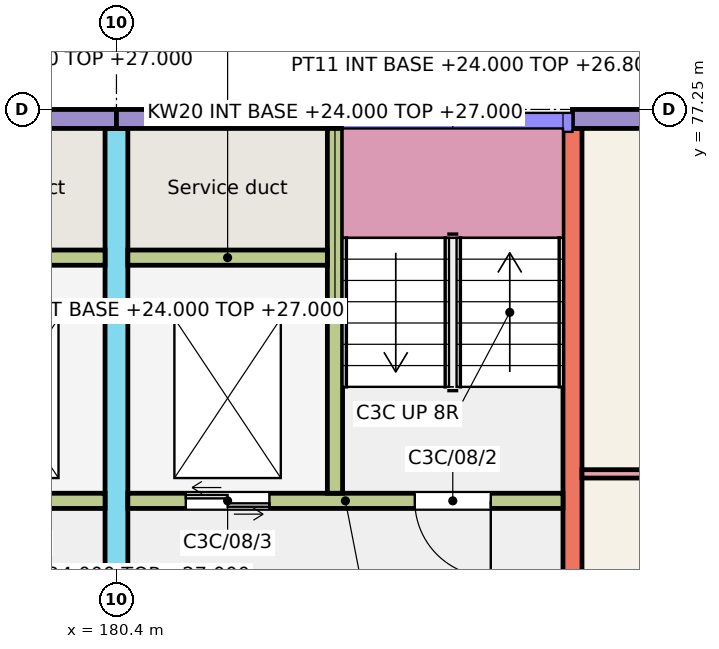
"""IFC4 building model, lengths in metres.
Left out: names, types, materials, properties, quantities, classifications, styles, units other than length and angle.
Written with IfcOpenShell. Run it as: python <this file> out.ifc"""

import sys

from ifc_helpers import new_model, si_unit, direction, frame, frame_2d, origin, place, context, subcontext, project, spatial, rectangle, extrude, element, fill, save


model = new_model("IFC4")
c1 = context("Model", 3, precision=1e-05, world=origin(), true_north=direction((0.0, 1.0)))
c2 = subcontext(c1, "Body", "Model", "MODEL_VIEW")
j1 = project(units=[si_unit("LENGTHUNIT", "METRE"), si_unit("PLANEANGLEUNIT", "RADIAN")], contexts=[c1])
p1 = place(None, origin())
s1 = spatial("IfcSite", under=j1, at=p1, CompositionType="ELEMENT")
p2 = place(p1, origin())
s2 = spatial("IfcBuilding", under=s1, at=p2, CompositionType="ELEMENT")
p3 = place(p2, frame((0.0, 0.0, 24.0)))
s3 = spatial("IfcBuildingStorey", under=s2, at=p3, CompositionType="ELEMENT", Elevation=24.0)
p4 = place(p3, frame((180.4, 66.0, 0.0), z_axis=(0.0, 0.0, 1.0), x_axis=(0.0, 1.0, 0.0)))
e1 = element("IfcWall", 1, at=p4, inside=s3, PredefinedType="SHEAR", context=c2, shape_type="SweptSolid", body=[
    extrude(rectangle(XDim=11.0, YDim=0.3, at=frame_2d((5.5, 0.0))), origin(), (0.0, 0.0, 1.0), 3.0),
])
p5 = place(p4, frame((0.3, 0.0, 0.0)))
e2 = element("IfcOpeningElement", 2, at=p5, cuts=e1, PredefinedType="OPENING", context=c2, shape_type="SweptSolid", body=[
    extrude(rectangle(XDim=1.2, YDim=2.1, at=frame_2d((0.6, 1.05))), frame((0.0, 0.16, 0.0), z_axis=(0.0, -1.0, 0.0), x_axis=(1.0, 0.0, 0.0)), (0.0, 0.0, 1.0), 0.32),
])
p6 = place(p3, frame((186.4, 68.0, 0.0), z_axis=(0.0, 0.0, 1.0), x_axis=(0.0, 1.0, 0.0)))
e3 = element("IfcWall", 3, at=p6, inside=s3, PredefinedType="SHEAR", context=c2, shape_type="SweptSolid", body=[
    extrude(rectangle(XDim=9.0, YDim=0.25, at=frame_2d((4.5, 0.0))), origin(), (0.0, 0.0, 1.0), 3.0),
])
p7 = place(p3, frame((177.425, 77.125, 0.0), z_axis=(0.0, 0.0, 1.0), x_axis=(1.0, 0.0, 0.0)))
e4 = element("IfcWall", 4, at=p7, inside=s3, PredefinedType="SOLIDWALL", context=c2, shape_type="SweptSolid", body=[
    extrude(rectangle(XDim=2.975, YDim=0.25, at=frame_2d((1.487, 0.0))), origin(), (0.0, 0.0, 1.0), 3.0),
])
p8 = place(p3, frame((174.525, 72.1, 0.0), z_axis=(0.0, 0.0, 1.0), x_axis=(1.0, 0.0, 0.0)))
e5 = element("IfcWall", 5, at=p8, inside=s3, PredefinedType="SHEAR", context=c2, shape_type="SweptSolid", body=[
    extrude(rectangle(XDim=5.725, YDim=0.2, at=frame_2d((2.863, 0.0))), origin(), (0.0, 0.0, 1.0), 3.0),
])
p9 = place(p8, frame((0.95, 0.0, 0.0)))
e6 = element("IfcOpeningElement", 6, at=p9, cuts=e5, PredefinedType="OPENING", context=c2, shape_type="SweptSolid", body=[
    extrude(rectangle(XDim=1.0, YDim=2.1, at=frame_2d((0.5, 1.05))), frame((0.0, 0.11, 0.0), z_axis=(0.0, -1.0, 0.0), x_axis=(1.0, 0.0, 0.0)), (0.0, 0.0, 1.0), 0.22),
])
p10 = place(p8, frame((3.863, 0.0, 0.0)))
e7 = element("IfcOpeningElement", 7, at=p10, cuts=e5, PredefinedType="OPENING", context=c2, shape_type="SweptSolid", body=[
    extrude(rectangle(XDim=1.1, YDim=2.1, at=frame_2d((0.55, 1.05))), frame((0.0, 0.11, 0.0), z_axis=(0.0, -1.0, 0.0), x_axis=(1.0, 0.0, 0.0)), (0.0, 0.0, 1.0), 0.22),
])
p11 = place(p3, frame((177.625, 75.3, 0.0), z_axis=(0.0, 0.0, 1.0), x_axis=(1.0, 0.0, 0.0)))
e8 = element("IfcWall", 8, at=p11, inside=s3, PredefinedType="SHEAR", context=c2, shape_type="SweptSolid", body=[
    extrude(rectangle(XDim=2.625, YDim=0.2, at=frame_2d((1.312, 0.0))), origin(), (0.0, 0.0, 1.0), 3.0),
])
p12 = place(p3, frame((180.4, 77.125, 0.0), z_axis=(0.0, 0.0, 1.0), x_axis=(1.0, 0.0, 0.0)))
e9 = element("IfcWall", 9, at=p12, inside=s3, PredefinedType="SOLIDWALL", context=c2, shape_type="SweptSolid", body=[
    extrude(rectangle(XDim=2.975, YDim=0.25, at=frame_2d((1.488, 0.0))), origin(), (0.0, 0.0, 1.0), 3.0),
])
p13 = place(p3, frame((180.55, 72.1, 0.0), z_axis=(0.0, 0.0, 1.0), x_axis=(1.0, 0.0, 0.0)))
e10 = element("IfcWall", 10, at=p13, inside=s3, PredefinedType="SHEAR", context=c2, shape_type="SweptSolid", body=[
    extrude(rectangle(XDim=5.725, YDim=0.2, at=frame_2d((2.862, 0.0))), origin(), (0.0, 0.0, 1.0), 3.0),
])
p14 = place(p13, frame((3.775, 0.0, 0.0)))
e11 = element("IfcOpeningElement", 11, at=p14, cuts=e10, PredefinedType="OPENING", context=c2, shape_type="SweptSolid", body=[
    extrude(rectangle(XDim=1.0, YDim=2.1, at=frame_2d((0.5, 1.05))), frame((0.0, 0.11, 0.0), z_axis=(0.0, -1.0, 0.0), x_axis=(1.0, 0.0, 0.0)), (0.0, 0.0, 1.0), 0.22),
])
p15 = place(p13, frame((0.762, 0.0, 0.0)))
e12 = element("IfcOpeningElement", 12, at=p15, cuts=e10, PredefinedType="OPENING", context=c2, shape_type="SweptSolid", body=[
    extrude(rectangle(XDim=1.1, YDim=2.1, at=frame_2d((0.55, 1.05))), frame((0.0, 0.11, 0.0), z_axis=(0.0, -1.0, 0.0), x_axis=(1.0, 0.0, 0.0)), (0.0, 0.0, 1.0), 0.22),
])
p16 = place(p3, frame((183.275, 72.2, 0.0), z_axis=(0.0, 0.0, 1.0), x_axis=(0.0, 1.0, 0.0)))
e13 = element("IfcWall", 13, at=p16, inside=s3, PredefinedType="SHEAR", context=c2, shape_type="SweptSolid", body=[
    extrude(rectangle(XDim=4.8, YDim=0.2, at=frame_2d((2.4, 0.0))), origin(), (0.0, 0.0, 1.0), 3.0),
])
p17 = place(p3, frame((180.55, 75.3, 0.0), z_axis=(0.0, 0.0, 1.0), x_axis=(1.0, 0.0, 0.0)))
e14 = element("IfcWall", 14, at=p17, inside=s3, PredefinedType="SHEAR", context=c2, shape_type="SweptSolid", body=[
    extrude(rectangle(XDim=2.625, YDim=0.2, at=frame_2d((1.312, 0.0))), origin(), (0.0, 0.0, 1.0), 3.0),
])
p18 = place(p3, frame((186.4, 77.125, 0.0), z_axis=(0.0, 0.0, 1.0), x_axis=(1.0, 0.0, 0.0)))
e15 = element("IfcWall", 15, at=p18, inside=s3, PredefinedType="SOLIDWALL", context=c2, shape_type="SweptSolid", body=[
    extrude(rectangle(XDim=3.6, YDim=0.25, at=frame_2d((1.8, 0.0))), origin(), (0.0, 0.0, 1.0), 3.0),
])
p19 = place(p18, frame((1.062, 0.0, 0.9)))
e16 = element("IfcOpeningElement", 16, at=p19, cuts=e15, PredefinedType="OPENING", context=c2, shape_type="SweptSolid", body=[
    extrude(rectangle(XDim=1.5, YDim=1.5, at=frame_2d((0.75, 0.75))), frame((0.0, 0.135, 0.0), z_axis=(0.0, -1.0, 0.0), x_axis=(1.0, 0.0, 0.0)), (0.0, 0.0, 1.0), 0.27),
])
p20 = place(p3, frame((186.525, 72.455, 0.0), z_axis=(0.0, 0.0, 1.0), x_axis=(1.0, 0.0, 0.0)))
e17 = element("IfcWall", 17, at=p20, inside=s3, PredefinedType="PARTITIONING", context=c2, shape_type="SweptSolid", body=[
    extrude(rectangle(XDim=3.375, YDim=0.11, at=frame_2d((1.688, 0.0))), origin(), (0.0, 0.0, 1.0), 2.8),
])
p21 = place(p14, origin())
e18 = element("IfcDoor", 18, at=p21, inside=s3, OperationType="SINGLE_SWING_RIGHT", PredefinedType="DOOR", context=c2, shape_type="SweptSolid", body=[
    extrude(rectangle(XDim=1.0, YDim=2.1, at=frame_2d((0.5, 1.05))), frame((0.0, 0.025, 0.0), z_axis=(0.0, -1.0, 0.0), x_axis=(1.0, 0.0, 0.0)), (0.0, 0.0, 1.0), 0.05),
])
fill(e11, e18)
p22 = place(p15, origin())
e19 = element("IfcDoor", 19, at=p22, inside=s3, OperationType="DOUBLE_DOOR_SLIDING", PredefinedType="DOOR", context=c2, shape_type="SweptSolid", body=[
    extrude(rectangle(XDim=1.1, YDim=2.1, at=frame_2d((0.55, 1.05))), frame((0.0, 0.025, 0.0), z_axis=(0.0, -1.0, 0.0), x_axis=(1.0, 0.0, 0.0)), (0.0, 0.0, 1.0), 0.05),
])
fill(e12, e19)
save(model, sys.argv[1])
